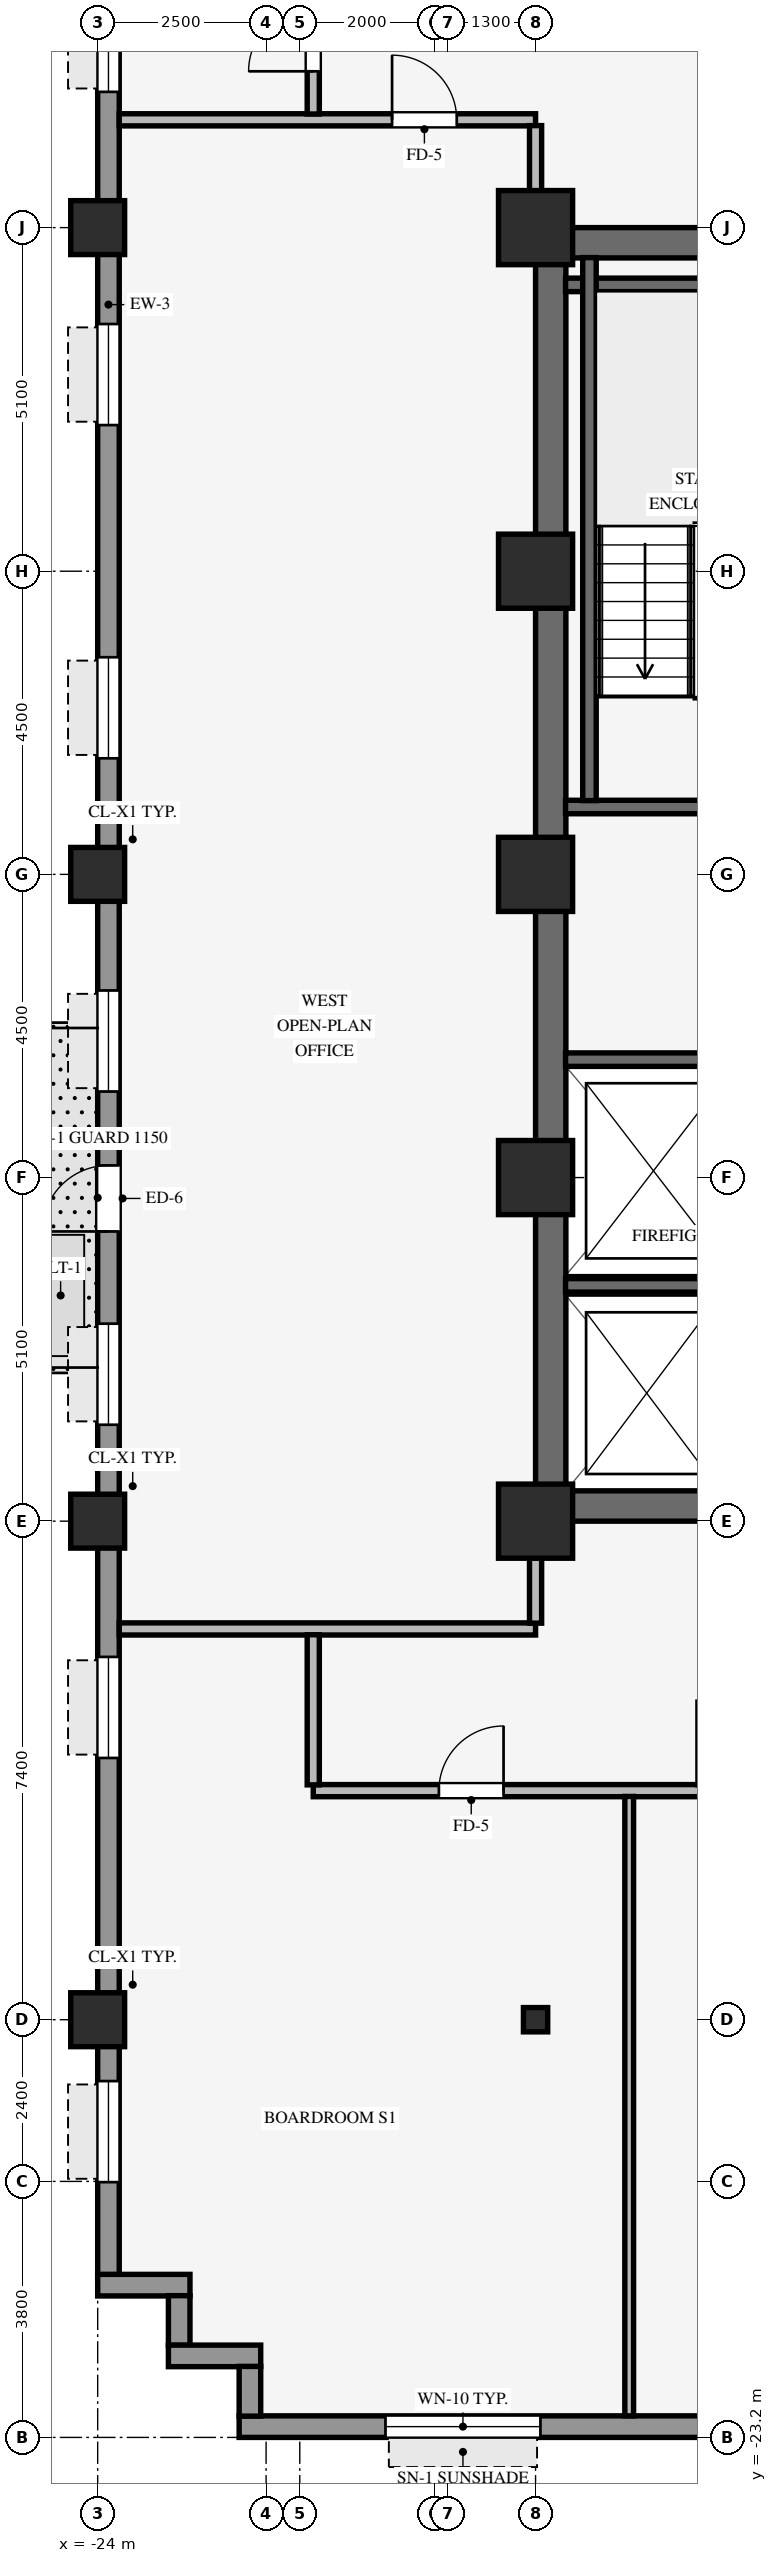
"""IFC4 building model, lengths in metres.
Left out: names, types, materials, properties, quantities, classifications, styles, units other than length and angle.
Written with IfcOpenShell. Run it as: python <this file> out.ifc"""

import sys

from ifc_helpers import new_model, si_unit, direction, frame, frame_2d, origin, origin_2d, place, context, subcontext, project, spatial, rectangle, hollow_rectangle, i_section, extrude, source, transform, mapped, element, fill, save


model = new_model("IFC4")
c1 = context("Model", 3, precision=1e-05, world=origin(), true_north=direction((0.0, 1.0)))
c2 = subcontext(c1, "Body", "Model", "MODEL_VIEW")
j1 = project(units=[si_unit("LENGTHUNIT", "METRE"), si_unit("PLANEANGLEUNIT", "RADIAN")], contexts=[c1])
p1 = place(None, origin())
s1 = spatial("IfcSite", under=j1, at=p1, CompositionType="ELEMENT")
p2 = place(p1, origin())
s2 = spatial("IfcBuilding", under=s1, at=p2, CompositionType="ELEMENT")
p3 = place(p2, frame((0.0, 0.0, 86.0)))
s3 = spatial("IfcBuildingStorey", under=s2, at=p3, CompositionType="ELEMENT", Elevation=86.0)
for number, where, z_axis, x_axis in (
    (1, (-17.5, -9.375, 0.0), (0.0, 0.0, 1.0), (1.0, 0.0, 0.0)),
    (2, (-17.5, 9.375, 0.0), (0.0, 0.0, 1.0), (1.0, 0.0, 0.0)),
):
    element("IfcWall", number, at=place(p3, frame(where, z_axis=z_axis, x_axis=x_axis)), inside=s3, PredefinedType="SHEAR", context=c2, shape_type="SweptSolid", body=[
        extrude(rectangle(XDim=8.5, YDim=0.45, at=frame_2d((4.25, 0.0))), origin(), (0.0, 0.0, 1.0), 3.37),
    ])
p4 = place(p3, frame((-17.275, -9.155, 0.0), z_axis=(0.0, 0.0, 1.0), x_axis=(0.0, 1.0, 0.0)))
e3 = element("IfcWall", 3, at=p4, inside=s3, PredefinedType="SHEAR", context=c2, shape_type="SweptSolid", body=[
    extrude(rectangle(XDim=18.31, YDim=0.45, at=frame_2d((9.155, 0.0))), origin(), (0.0, 0.0, 1.0), 3.37),
])
for number, where, z_axis, x_axis in (
    (4, (-17.5, -9.6, 0.0), (0.0, 0.0, 1.0), (1.0, 0.0, 0.0)),
    (5, (-17.5, -4.5, 0.0), (0.0, 0.0, 1.0), (1.0, 0.0, 0.0)),
    (6, (-17.5, 4.5, 0.0), (0.0, 0.0, 1.0), (1.0, 0.0, 0.0)),
    (7, (-17.5, 9.6, 0.0), (0.0, 0.0, 1.0), (1.0, 0.0, 0.0)),
    (8, (-17.5, 0.0, 0.0), (0.0, 0.0, 1.0), (1.0, 0.0, 0.0)),
):
    element("IfcColumn", number, at=place(p3, frame(where, z_axis=z_axis, x_axis=x_axis)), inside=s3, PredefinedType="COLUMN", context=c2, shape_type="SweptSolid", body=[
        extrude(rectangle(XDim=1.1, YDim=1.1, at=origin_2d()), origin(), (0.0, 0.0, 1.0), 3.37),
    ])
for number, where, z_axis, x_axis in (
    (9, (-24.0, -17.0, -0.4), (0.0, 0.0, 1.0), (1.0, 0.0, 0.0)),
    (10, (-24.0, -9.6, -0.4), (0.0, 0.0, 1.0), (1.0, 0.0, 0.0)),
    (11, (-24.0, 0.0, -0.4), (0.0, 0.0, 1.0), (1.0, 0.0, 0.0)),
    (12, (-24.0, 9.6, -0.4), (0.0, 0.0, 1.0), (1.0, 0.0, 0.0)),
):
    element("IfcColumn", number, at=place(p3, frame(where, z_axis=z_axis, x_axis=x_axis)), inside=s3, PredefinedType="COLUMN", context=c2, shape_type="SweptSolid", body=[
        extrude(hollow_rectangle(XDim=0.8, YDim=0.8, WallThickness=0.055, InnerFilletRadius=0.055, OuterFilletRadius=0.11, at=origin_2d()), origin(), (0.0, 0.0, 1.0), 3.77),
    ])
p5 = place(p3, frame((-17.5, -17.0, 0.0), z_axis=(0.0, 0.0, 1.0), x_axis=(1.0, 0.0, 0.0)))
e13 = element("IfcColumn", 13, at=p5, inside=s3, PredefinedType="COLUMN", context=c2, shape_type="SweptSolid", body=[
    extrude(i_section(OverallWidth=0.36, OverallDepth=0.36, WebThickness=0.021, FlangeThickness=0.021, FilletRadius=0.018, at=origin_2d()), origin(), (0.0, 0.0, 1.0), 3.37),
])
p6 = place(p3, frame((-21.9, -23.04, 0.0), z_axis=(0.0, 0.0, 1.0), x_axis=(1.0, 0.0, 0.0)))
e14 = element("IfcWall", 14, at=p6, inside=s3, PredefinedType="STANDARD", context=c2, shape_type="SweptSolid", body=[
    extrude(rectangle(XDim=43.8, YDim=0.32, at=frame_2d((21.9, 0.0))), origin(), (0.0, 0.0, 1.0), 2.705),
])
p7 = place(p6, frame((2.172, 0.0, 0.8)))
e15 = element("IfcOpeningElement", 15, at=p7, cuts=e14, PredefinedType="OPENING", context=c2, shape_type="SweptSolid", body=[
    extrude(rectangle(XDim=2.3, YDim=1.62, at=frame_2d((1.15, 0.81))), frame((0.0, 0.17, 0.0), z_axis=(0.0, -1.0, 0.0), x_axis=(1.0, 0.0, 0.0)), (0.0, 0.0, 1.0), 0.34),
])
p8 = place(p6, frame((6.817, 0.0, 0.8)))
e16 = element("IfcOpeningElement", 16, at=p8, cuts=e14, PredefinedType="OPENING", context=c2, shape_type="SweptSolid", body=[
    extrude(rectangle(XDim=2.3, YDim=1.62, at=frame_2d((1.15, 0.81))), frame((0.0, 0.17, 0.0), z_axis=(0.0, -1.0, 0.0), x_axis=(1.0, 0.0, 0.0)), (0.0, 0.0, 1.0), 0.34),
])
p9 = place(p6, frame((16.106, 0.0, 0.8)))
e17 = element("IfcOpeningElement", 17, at=p9, cuts=e14, PredefinedType="OPENING", context=c2, shape_type="SweptSolid", body=[
    extrude(rectangle(XDim=2.3, YDim=1.62, at=frame_2d((1.15, 0.81))), frame((0.0, 0.17, 0.0), z_axis=(0.0, -1.0, 0.0), x_axis=(1.0, 0.0, 0.0)), (0.0, 0.0, 1.0), 0.34),
])
p10 = place(p6, frame((25.394, 0.0, 0.8)))
e18 = element("IfcOpeningElement", 18, at=p10, cuts=e14, PredefinedType="OPENING", context=c2, shape_type="SweptSolid", body=[
    extrude(rectangle(XDim=2.3, YDim=1.62, at=frame_2d((1.15, 0.81))), frame((0.0, 0.17, 0.0), z_axis=(0.0, -1.0, 0.0), x_axis=(1.0, 0.0, 0.0)), (0.0, 0.0, 1.0), 0.34),
])
p11 = place(p6, frame((34.683, 0.0, 0.8)))
e19 = element("IfcOpeningElement", 19, at=p11, cuts=e14, PredefinedType="OPENING", context=c2, shape_type="SweptSolid", body=[
    extrude(rectangle(XDim=2.3, YDim=1.62, at=frame_2d((1.15, 0.81))), frame((0.0, 0.17, 0.0), z_axis=(0.0, -1.0, 0.0), x_axis=(1.0, 0.0, 0.0)), (0.0, 0.0, 1.0), 0.34),
])
p12 = place(p6, frame((39.328, 0.0, 0.8)))
e20 = element("IfcOpeningElement", 20, at=p12, cuts=e14, PredefinedType="OPENING", context=c2, shape_type="SweptSolid", body=[
    extrude(rectangle(XDim=2.3, YDim=1.62, at=frame_2d((1.15, 0.81))), frame((0.0, 0.17, 0.0), z_axis=(0.0, -1.0, 0.0), x_axis=(1.0, 0.0, 0.0)), (0.0, 0.0, 1.0), 0.34),
])
p13 = place(p3, frame((-23.84, -20.784, 0.0), z_axis=(0.0, 0.0, 1.0), x_axis=(0.0, 1.0, 0.0)))
e21 = element("IfcWall", 21, at=p13, inside=s3, PredefinedType="STANDARD", context=c2, shape_type="SweptSolid", body=[
    extrude(rectangle(XDim=41.568, YDim=0.32, at=frame_2d((20.784, 0.0))), origin(), (0.0, 0.0, 1.0), 2.705),
])
p14 = place(p13, frame((15.484, 0.0, 0.0)))
e22 = element("IfcOpeningElement", 22, at=p14, cuts=e21, PredefinedType="OPENING", context=c2, shape_type="SweptSolid", body=[
    extrude(rectangle(XDim=0.98, YDim=2.15, at=frame_2d((0.49, 1.075))), frame((0.0, 0.17, 0.0), z_axis=(0.0, -1.0, 0.0), x_axis=(1.0, 0.0, 0.0)), (0.0, 0.0, 1.0), 0.34),
])
p15 = place(p13, frame((1.373, 0.0, 0.8)))
e23 = element("IfcOpeningElement", 23, at=p15, cuts=e21, PredefinedType="OPENING", context=c2, shape_type="SweptSolid", body=[
    extrude(rectangle(XDim=1.5, YDim=1.6, at=frame_2d((0.75, 0.8))), frame((0.0, 0.17, 0.0), z_axis=(0.0, -1.0, 0.0), x_axis=(1.0, 0.0, 0.0)), (0.0, 0.0, 1.0), 0.34),
])
p16 = place(p13, frame((7.669, 0.0, 0.8)))
e24 = element("IfcOpeningElement", 24, at=p16, cuts=e21, PredefinedType="OPENING", context=c2, shape_type="SweptSolid", body=[
    extrude(rectangle(XDim=1.5, YDim=1.6, at=frame_2d((0.75, 0.8))), frame((0.0, 0.17, 0.0), z_axis=(0.0, -1.0, 0.0), x_axis=(1.0, 0.0, 0.0)), (0.0, 0.0, 1.0), 0.34),
])
p17 = place(p13, frame((12.615, 0.0, 0.8)))
e25 = element("IfcOpeningElement", 25, at=p17, cuts=e21, PredefinedType="OPENING", context=c2, shape_type="SweptSolid", body=[
    extrude(rectangle(XDim=1.5, YDim=1.6, at=frame_2d((0.75, 0.8))), frame((0.0, 0.17, 0.0), z_axis=(0.0, -1.0, 0.0), x_axis=(1.0, 0.0, 0.0)), (0.0, 0.0, 1.0), 0.34),
])
p18 = place(p13, frame((17.561, 0.0, 0.8)))
e26 = element("IfcOpeningElement", 26, at=p18, cuts=e21, PredefinedType="OPENING", context=c2, shape_type="SweptSolid", body=[
    extrude(rectangle(XDim=1.5, YDim=1.6, at=frame_2d((0.75, 0.8))), frame((0.0, 0.17, 0.0), z_axis=(0.0, -1.0, 0.0), x_axis=(1.0, 0.0, 0.0)), (0.0, 0.0, 1.0), 0.34),
])
p19 = place(p13, frame((22.507, 0.0, 0.8)))
e27 = element("IfcOpeningElement", 27, at=p19, cuts=e21, PredefinedType="OPENING", context=c2, shape_type="SweptSolid", body=[
    extrude(rectangle(XDim=1.5, YDim=1.6, at=frame_2d((0.75, 0.8))), frame((0.0, 0.17, 0.0), z_axis=(0.0, -1.0, 0.0), x_axis=(1.0, 0.0, 0.0)), (0.0, 0.0, 1.0), 0.34),
])
p20 = place(p13, frame((27.453, 0.0, 0.8)))
e28 = element("IfcOpeningElement", 28, at=p20, cuts=e21, PredefinedType="OPENING", context=c2, shape_type="SweptSolid", body=[
    extrude(rectangle(XDim=1.5, YDim=1.6, at=frame_2d((0.75, 0.8))), frame((0.0, 0.17, 0.0), z_axis=(0.0, -1.0, 0.0), x_axis=(1.0, 0.0, 0.0)), (0.0, 0.0, 1.0), 0.34),
])
p21 = place(p13, frame((32.399, 0.0, 0.8)))
e29 = element("IfcOpeningElement", 29, at=p21, cuts=e21, PredefinedType="OPENING", context=c2, shape_type="SweptSolid", body=[
    extrude(rectangle(XDim=1.5, YDim=1.6, at=frame_2d((0.75, 0.8))), frame((0.0, 0.17, 0.0), z_axis=(0.0, -1.0, 0.0), x_axis=(1.0, 0.0, 0.0)), (0.0, 0.0, 1.0), 0.34),
])
p22 = place(p13, frame((38.695, 0.0, 0.8)))
e30 = element("IfcOpeningElement", 30, at=p22, cuts=e21, PredefinedType="OPENING", context=c2, shape_type="SweptSolid", body=[
    extrude(rectangle(XDim=1.5, YDim=1.6, at=frame_2d((0.75, 0.8))), frame((0.0, 0.17, 0.0), z_axis=(0.0, -1.0, 0.0), x_axis=(1.0, 0.0, 0.0)), (0.0, 0.0, 1.0), 0.34),
])
p23 = place(p3, frame((-24.0, -20.94, 0.0), z_axis=(0.0, 0.0, 1.0), x_axis=(1.0, 0.0, 0.0)))
e31 = element("IfcWall", 31, at=p23, inside=s3, PredefinedType="STANDARD", context=c2, shape_type="SweptSolid", body=[
    extrude(rectangle(XDim=1.37, YDim=0.32, at=frame_2d((0.685, 0.0))), origin(), (0.0, 0.0, 1.0), 3.36),
])
p24 = place(p3, frame((-22.79, -21.834, 0.0), z_axis=(0.0, 0.0, 1.0), x_axis=(0.0, 1.0, 0.0)))
e32 = element("IfcWall", 32, at=p24, inside=s3, PredefinedType="STANDARD", context=c2, shape_type="SweptSolid", body=[
    extrude(rectangle(XDim=0.738, YDim=0.32, at=frame_2d((0.369, 0.0))), origin(), (0.0, 0.0, 1.0), 3.36),
])
p25 = place(p3, frame((-22.95, -21.99, 0.0), z_axis=(0.0, 0.0, 1.0), x_axis=(1.0, 0.0, 0.0)))
e33 = element("IfcWall", 33, at=p25, inside=s3, PredefinedType="STANDARD", context=c2, shape_type="SweptSolid", body=[
    extrude(rectangle(XDim=1.37, YDim=0.32, at=frame_2d((0.685, 0.0))), origin(), (0.0, 0.0, 1.0), 3.36),
])
p26 = place(p3, frame((-21.74, -22.884, 0.0), z_axis=(0.0, 0.0, 1.0), x_axis=(0.0, 1.0, 0.0)))
e34 = element("IfcWall", 34, at=p26, inside=s3, PredefinedType="STANDARD", context=c2, shape_type="SweptSolid", body=[
    extrude(rectangle(XDim=0.738, YDim=0.32, at=frame_2d((0.369, 0.0))), origin(), (0.0, 0.0, 1.0), 3.36),
])
for number, where, z_axis, x_axis in (
    (35, (-17.055, 1.0, 0.0), (0.0, 0.0, 1.0), (1.0, 0.0, 0.0)),
    (36, (-17.055, 8.75, 0.0), (0.0, 0.0, 1.0), (1.0, 0.0, 0.0)),
):
    element("IfcWall", number, at=place(p3, frame(where, z_axis=z_axis, x_axis=x_axis)), inside=s3, PredefinedType="SHEAR", context=c2, shape_type="SweptSolid", body=[
        extrude(rectangle(XDim=3.52, YDim=0.2, at=frame_2d((1.76, 0.0))), origin(), (0.0, 0.0, 1.0), 3.37),
    ])
p27 = place(p3, frame((-16.7, 1.095, 0.0), z_axis=(0.0, 0.0, 1.0), x_axis=(0.0, 1.0, 0.0)))
e37 = element("IfcWall", 37, at=p27, inside=s3, PredefinedType="SHEAR", context=c2, shape_type="SweptSolid", body=[
    extrude(rectangle(XDim=8.06, YDim=0.2, at=frame_2d((4.03, 0.0))), origin(), (0.0, 0.0, 1.0), 3.37),
])
p28 = place(p3, frame((-17.055, -6.1, 0.0), z_axis=(0.0, 0.0, 1.0), x_axis=(1.0, 0.0, 0.0)))
e38 = element("IfcWall", 38, at=p28, inside=s3, PredefinedType="SHEAR", context=c2, shape_type="SweptSolid", body=[
    extrude(rectangle(XDim=2.805, YDim=0.2, at=frame_2d((1.402, 0.0))), origin(), (0.0, 0.0, 1.0), 3.37),
])
p29 = place(p3, frame((-17.055, -2.75, 0.0), z_axis=(0.0, 0.0, 1.0), x_axis=(1.0, 0.0, 0.0)))
e39 = element("IfcWall", 39, at=p29, inside=s3, PredefinedType="SHEAR", context=c2, shape_type="SweptSolid", body=[
    extrude(rectangle(XDim=2.61, YDim=0.2, at=frame_2d((1.305, 0.0))), origin(), (0.0, 0.0, 1.0), 3.37),
])
p30 = place(p3, frame((-20.8, -13.6, 0.0), z_axis=(0.0, 0.0, 1.0), x_axis=(1.0, 0.0, 0.0)))
e40 = element("IfcWall", 40, at=p30, inside=s3, PredefinedType="PARTITIONING", context=c2, shape_type="SweptSolid", body=[
    extrude(rectangle(XDim=5.8, YDim=0.18, at=frame_2d((2.9, 0.0))), origin(), (0.0, 0.0, 1.0), 2.998),
])
p31 = place(p30, frame((1.865, 0.0, 0.0)))
e41 = element("IfcOpeningElement", 41, at=p31, cuts=e40, PredefinedType="OPENING", context=c2, shape_type="SweptSolid", body=[
    extrude(rectangle(XDim=0.96, YDim=2.1, at=frame_2d((0.48, 1.05))), frame((0.0, 0.1, 0.0), z_axis=(0.0, -1.0, 0.0), x_axis=(1.0, 0.0, 0.0)), (0.0, 0.0, 1.0), 0.2),
])
p32 = place(p3, frame((-23.68, -11.2, 0.0), z_axis=(0.0, 0.0, 1.0), x_axis=(1.0, 0.0, 0.0)))
e42 = element("IfcWall", 42, at=p32, inside=s3, PredefinedType="PARTITIONING", context=c2, shape_type="SweptSolid", body=[
    extrude(rectangle(XDim=6.18, YDim=0.18, at=frame_2d((3.09, 0.0))), origin(), (0.0, 0.0, 1.0), 3.36),
])
p33 = place(p3, frame((-23.68, 11.2, 0.0), z_axis=(0.0, 0.0, 1.0), x_axis=(1.0, 0.0, 0.0)))
e43 = element("IfcWall", 43, at=p33, inside=s3, PredefinedType="PARTITIONING", context=c2, shape_type="SweptSolid", body=[
    extrude(rectangle(XDim=6.18, YDim=0.18, at=frame_2d((3.09, 0.0))), origin(), (0.0, 0.0, 1.0), 3.36),
])
p34 = place(p33, frame((4.05, 0.0, 0.0)))
e44 = element("IfcOpeningElement", 44, at=p34, cuts=e43, PredefinedType="OPENING", context=c2, shape_type="SweptSolid", body=[
    extrude(rectangle(XDim=0.96, YDim=2.1, at=frame_2d((0.48, 1.05))), frame((0.0, 0.1, 0.0), z_axis=(0.0, -1.0, 0.0), x_axis=(1.0, 0.0, 0.0)), (0.0, 0.0, 1.0), 0.2),
])
p35 = place(p3, frame((-20.8, -13.514, 0.0), z_axis=(0.0, 0.0, 1.0), x_axis=(0.0, 1.0, 0.0)))
e45 = element("IfcWall", 45, at=p35, inside=s3, PredefinedType="PARTITIONING", context=c2, shape_type="SweptSolid", body=[
    extrude(rectangle(XDim=2.228, YDim=0.18, at=frame_2d((1.114, 0.0))), origin(), (0.0, 0.0, 1.0), 3.36),
])
p36 = place(p3, frame((-20.8, 11.286, 0.0), z_axis=(0.0, 0.0, 1.0), x_axis=(0.0, 1.0, 0.0)))
e46 = element("IfcWall", 46, at=p36, inside=s3, PredefinedType="PARTITIONING", context=c2, shape_type="SweptSolid", body=[
    extrude(rectangle(XDim=2.228, YDim=0.18, at=frame_2d((1.114, 0.0))), origin(), (0.0, 0.0, 1.0), 3.36),
])
p37 = place(p36, frame((0.634, 0.0, 0.0)))
e47 = element("IfcOpeningElement", 47, at=p37, cuts=e46, PredefinedType="OPENING", context=c2, shape_type="SweptSolid", body=[
    extrude(rectangle(XDim=0.96, YDim=2.1, at=frame_2d((0.48, 1.05))), frame((0.0, 0.1, 0.0), z_axis=(0.0, -1.0, 0.0), x_axis=(1.0, 0.0, 0.0)), (0.0, 0.0, 1.0), 0.2),
])
for number, where, z_axis, x_axis in (
    (48, (-17.5, -11.114, 0.0), (0.0, 0.0, 1.0), (0.0, 1.0, 0.0)),
    (49, (-17.5, 10.146, 0.0), (0.0, 0.0, 1.0), (0.0, 1.0, 0.0)),
):
    element("IfcWall", number, at=place(p3, frame(where, z_axis=z_axis, x_axis=x_axis)), inside=s3, PredefinedType="PARTITIONING", context=c2, shape_type="SweptSolid", body=[
        extrude(rectangle(XDim=0.968, YDim=0.18, at=frame_2d((0.484, 0.0))), origin(), (0.0, 0.0, 1.0), 2.738),
    ])
p38 = place(p3, frame((-16.11, -22.88, 0.0), z_axis=(0.0, 0.0, 1.0), x_axis=(0.0, 1.0, 0.0)))
e50 = element("IfcWall", 50, at=p38, inside=s3, PredefinedType="PARTITIONING", context=c2, shape_type="SweptSolid", body=[
    extrude(rectangle(XDim=9.194, YDim=0.13, at=frame_2d((4.597, 0.0))), origin(), (0.0, 0.0, 1.0), 3.36),
])
m1 = source(origin(), c2, "Body", "SweptSolid", [
    extrude(rectangle(XDim=2.3, YDim=1.62, at=frame_2d((1.15, 0.81))), frame((0.0, 0.03, 0.0), z_axis=(0.0, -1.0, 0.0), x_axis=(1.0, 0.0, 0.0)), (0.0, 0.0, 1.0), 0.06),
])
p39 = place(p7, origin())
e51 = element("IfcWindow", 51, at=p39, inside=s3, PartitioningType="SINGLE_PANEL", PredefinedType="WINDOW", context=c2, shape_type="MappedRepresentation", body=[
    mapped(m1, transform((0.0, 0.0, 0.0), scale=1.0)),
])
fill(e15, e51)
m2 = source(origin(), c2, "Body", "SweptSolid", [
    extrude(rectangle(XDim=0.98, YDim=2.15, at=frame_2d((0.49, 1.075))), frame((0.0, 0.025, 0.0), z_axis=(0.0, -1.0, 0.0), x_axis=(1.0, 0.0, 0.0)), (0.0, 0.0, 1.0), 0.05),
])
p40 = place(p14, origin())
e52 = element("IfcDoor", 52, at=p40, inside=s3, OperationType="SINGLE_SWING_LEFT", PredefinedType="DOOR", context=c2, shape_type="MappedRepresentation", body=[
    mapped(m2, transform((0.0, 0.0, 0.0), scale=1.0)),
])
fill(e22, e52)
m3 = source(origin(), c2, "Body", "SweptSolid", [
    extrude(rectangle(XDim=1.5, YDim=1.6, at=frame_2d((0.75, 0.8))), frame((0.0, 0.03, 0.0), z_axis=(0.0, -1.0, 0.0), x_axis=(1.0, 0.0, 0.0)), (0.0, 0.0, 1.0), 0.06),
])
p41 = place(p15, origin())
e53 = element("IfcWindow", 53, at=p41, inside=s3, PartitioningType="SINGLE_PANEL", PredefinedType="WINDOW", context=c2, shape_type="MappedRepresentation", body=[
    mapped(m3, transform((0.0, 0.0, 0.0), scale=1.0)),
])
fill(e23, e53)
p42 = place(p16, origin())
e54 = element("IfcWindow", 54, at=p42, inside=s3, PartitioningType="SINGLE_PANEL", PredefinedType="WINDOW", context=c2, shape_type="MappedRepresentation", body=[
    mapped(m3, transform((0.0, 0.0, 0.0), scale=1.0)),
])
fill(e24, e54)
p43 = place(p17, origin())
e55 = element("IfcWindow", 55, at=p43, inside=s3, PartitioningType="SINGLE_PANEL", PredefinedType="WINDOW", context=c2, shape_type="MappedRepresentation", body=[
    mapped(m3, transform((0.0, 0.0, 0.0), scale=1.0)),
])
fill(e25, e55)
p44 = place(p18, origin())
e56 = element("IfcWindow", 56, at=p44, inside=s3, PartitioningType="SINGLE_PANEL", PredefinedType="WINDOW", context=c2, shape_type="MappedRepresentation", body=[
    mapped(m3, transform((0.0, 0.0, 0.0), scale=1.0)),
])
fill(e26, e56)
p45 = place(p19, origin())
e57 = element("IfcWindow", 57, at=p45, inside=s3, PartitioningType="SINGLE_PANEL", PredefinedType="WINDOW", context=c2, shape_type="MappedRepresentation", body=[
    mapped(m3, transform((0.0, 0.0, 0.0), scale=1.0)),
])
fill(e27, e57)
p46 = place(p20, origin())
e58 = element("IfcWindow", 58, at=p46, inside=s3, PartitioningType="SINGLE_PANEL", PredefinedType="WINDOW", context=c2, shape_type="MappedRepresentation", body=[
    mapped(m3, transform((0.0, 0.0, 0.0), scale=1.0)),
])
fill(e28, e58)
p47 = place(p21, origin())
e59 = element("IfcWindow", 59, at=p47, inside=s3, PartitioningType="SINGLE_PANEL", PredefinedType="WINDOW", context=c2, shape_type="MappedRepresentation", body=[
    mapped(m3, transform((0.0, 0.0, 0.0), scale=1.0)),
])
fill(e29, e59)
m4 = source(origin(), c2, "Body", "SweptSolid", [
    extrude(rectangle(XDim=0.96, YDim=2.1, at=frame_2d((0.48, 1.05))), frame((0.0, 0.025, 0.0), z_axis=(0.0, -1.0, 0.0), x_axis=(1.0, 0.0, 0.0)), (0.0, 0.0, 1.0), 0.05),
])
p48 = place(p31, origin())
e60 = element("IfcDoor", 60, at=p48, inside=s3, OperationType="SINGLE_SWING_RIGHT", PredefinedType="DOOR", context=c2, shape_type="MappedRepresentation", body=[
    mapped(m4, transform((0.0, 0.0, 0.0), scale=1.0)),
])
fill(e41, e60)
p49 = place(p34, origin())
e61 = element("IfcDoor", 61, at=p49, inside=s3, OperationType="SINGLE_SWING_LEFT", PredefinedType="DOOR", context=c2, shape_type="MappedRepresentation", body=[
    mapped(m4, transform((0.0, 0.0, 0.0), scale=1.0)),
])
fill(e44, e61)
p50 = place(p37, origin())
e62 = element("IfcDoor", 62, at=p50, inside=s3, OperationType="SINGLE_SWING_LEFT", PredefinedType="DOOR", context=c2, shape_type="MappedRepresentation", body=[
    mapped(m4, transform((0.0, 0.0, 0.0), scale=1.0)),
])
fill(e47, e62)
save(model, sys.argv[1])
